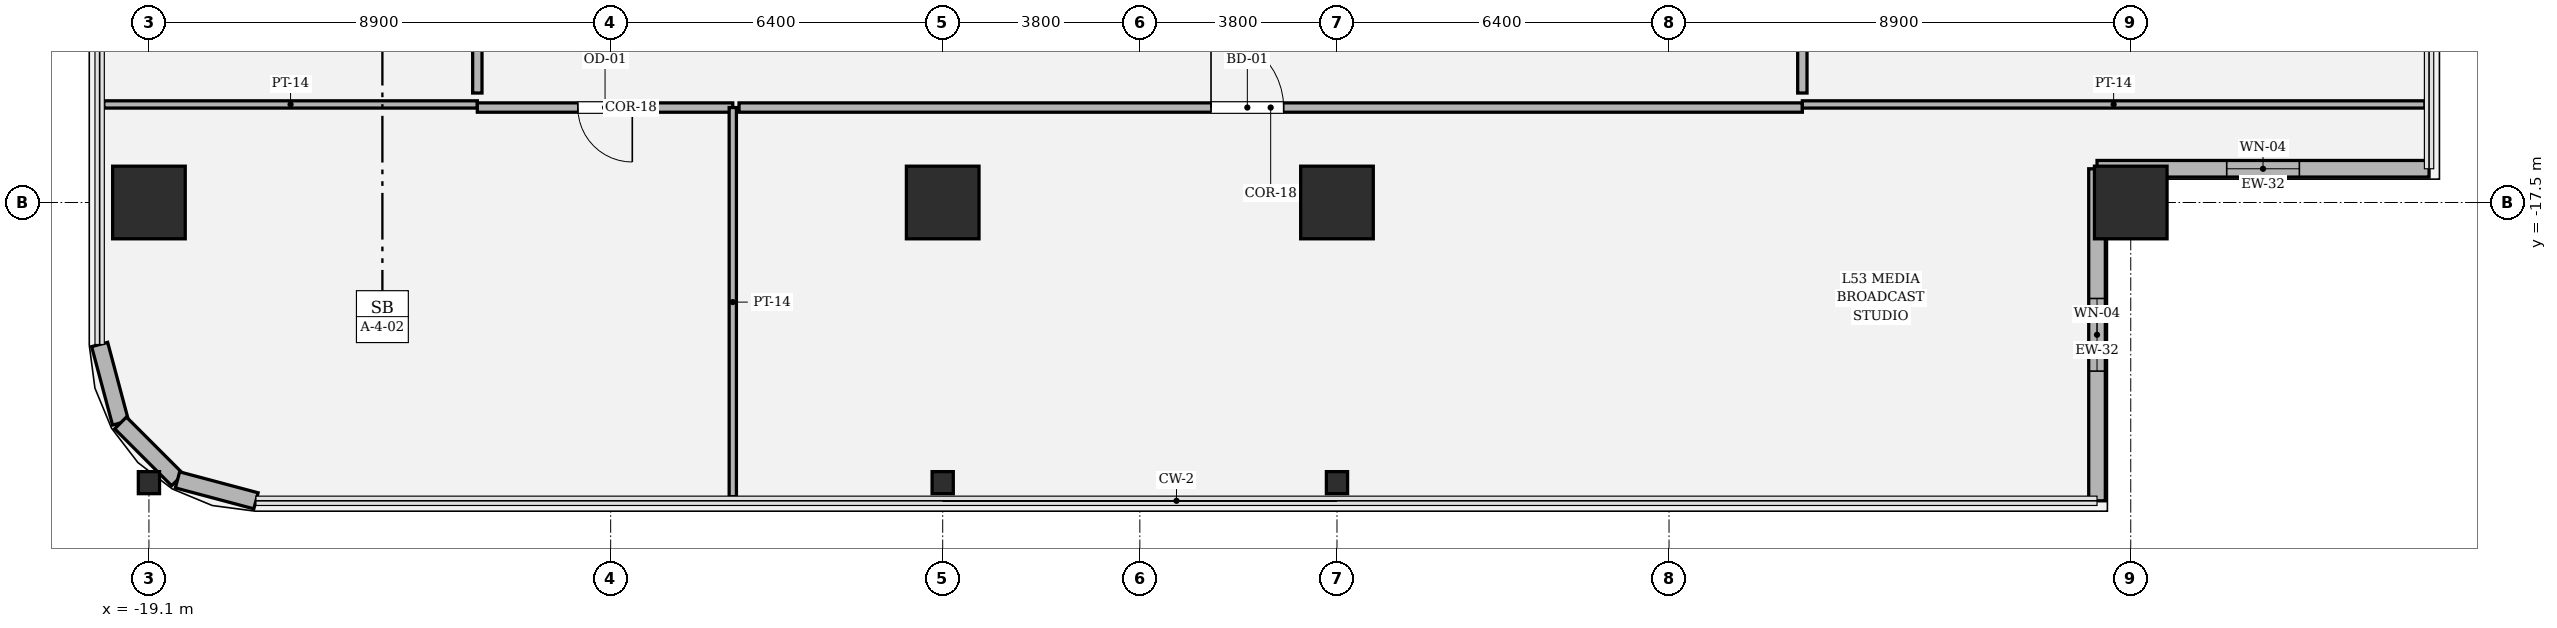
"""IFC4 building model, lengths in metres.
Left out: names, types, materials, properties, quantities, classifications, styles, units other than length and angle.
Written with IfcOpenShell. Run it as: python <this file> out.ifc"""

import sys

from ifc_helpers import new_model, si_unit, direction, frame, frame_2d, origin, origin_2d, place, context, subcontext, project, spatial, rectangle, hollow_rectangle, i_section, extrude, element, fill, save


model = new_model("IFC4")
c1 = context("Model", 3, precision=1e-05, world=origin(), true_north=direction((0.0, 1.0)))
c2 = subcontext(c1, "Body", "Model", "MODEL_VIEW")
j1 = project(units=[si_unit("LENGTHUNIT", "METRE"), si_unit("PLANEANGLEUNIT", "RADIAN")], contexts=[c1])
p1 = place(None, origin())
s1 = spatial("IfcSite", under=j1, at=p1, CompositionType="ELEMENT")
p2 = place(p1, origin())
s2 = spatial("IfcBuilding", under=s1, at=p2, CompositionType="ELEMENT")
p3 = place(p2, frame((0.0, 0.0, 224.85)))
s3 = spatial("IfcBuildingStorey", under=s2, at=p3, CompositionType="ELEMENT", Elevation=224.85)
for number, where, z_axis, x_axis in (
    (1, (-19.1, -17.5, 0.0), (0.0, 0.0, 1.0), (1.0, 0.0, 0.0)),
    (2, (-3.8, -17.5, 0.0), (0.0, 0.0, 1.0), (1.0, 0.0, 0.0)),
    (3, (3.8, -17.5, 0.0), (0.0, 0.0, 1.0), (1.0, 0.0, 0.0)),
    (4, (19.1, -17.5, 0.0), (0.0, 0.0, 1.0), (1.0, 0.0, 0.0)),
):
    element("IfcColumn", number, at=place(p3, frame(where, z_axis=z_axis, x_axis=x_axis)), inside=s3, PredefinedType="COLUMN", context=c2, shape_type="SweptSolid", body=[
        extrude(hollow_rectangle(XDim=1.4, YDim=1.4, WallThickness=0.042, at=origin_2d()), origin(), (0.0, 0.0, 1.0), 4.05),
    ])
for number, where, z_axis, x_axis in (
    (5, (-19.1, -22.9, 0.0), (0.0, 0.0, 1.0), (1.0, 0.0, 0.0)),
    (6, (-3.8, -22.9, 0.0), (0.0, 0.0, 1.0), (1.0, 0.0, 0.0)),
    (7, (3.8, -22.9, 0.0), (0.0, 0.0, 1.0), (1.0, 0.0, 0.0)),
):
    element("IfcColumn", number, at=place(p3, frame(where, z_axis=z_axis, x_axis=x_axis)), inside=s3, PredefinedType="COLUMN", context=c2, shape_type="SweptSolid", body=[
        extrude(i_section(OverallWidth=0.409, OverallDepth=0.425, WebThickness=0.032, FlangeThickness=0.052, FilletRadius=0.018, at=origin_2d()), origin(), (0.0, 0.0, 1.0), 4.048),
    ])
p4 = place(p3, frame((18.45, -23.25, 0.0), z_axis=(0.0, 0.0, 1.0), x_axis=(0.0, 1.0, 0.0)))
e8 = element("IfcWall", 8, at=p4, inside=s3, PredefinedType="SOLIDWALL", context=c2, shape_type="SweptSolid", body=[
    extrude(rectangle(XDim=6.4, YDim=0.32, at=frame_2d((3.2, 0.0))), origin(), (0.0, 0.0, 1.0), 3.174),
])
p5 = place(p4, frame((2.5, 0.0, 0.734)))
e9 = element("IfcOpeningElement", 9, at=p5, cuts=e8, PredefinedType="OPENING", context=c2, shape_type="SweptSolid", body=[
    extrude(rectangle(XDim=1.4, YDim=2.2, at=frame_2d((0.7, 1.1))), frame((0.0, 0.17, 0.0), z_axis=(0.0, -1.0, 0.0), x_axis=(1.0, 0.0, 0.0)), (0.0, 0.0, 1.0), 0.34),
])
p6 = place(p3, frame((18.45, -16.85, 0.0), z_axis=(0.0, 0.0, 1.0), x_axis=(1.0, 0.0, 0.0)))
e10 = element("IfcWall", 10, at=p6, inside=s3, PredefinedType="SOLIDWALL", context=c2, shape_type="SweptSolid", body=[
    extrude(rectangle(XDim=6.4, YDim=0.32, at=frame_2d((3.2, 0.0))), origin(), (0.0, 0.0, 1.0), 3.174),
])
p7 = place(p6, frame((2.5, 0.0, 0.734)))
e11 = element("IfcOpeningElement", 11, at=p7, cuts=e10, PredefinedType="OPENING", context=c2, shape_type="SweptSolid", body=[
    extrude(rectangle(XDim=1.4, YDim=2.2, at=frame_2d((0.7, 1.1))), frame((0.0, 0.17, 0.0), z_axis=(0.0, -1.0, 0.0), x_axis=(1.0, 0.0, 0.0)), (0.0, 0.0, 1.0), 0.34),
])
p8 = place(p3, frame((-20.05, -20.237, 0.0), z_axis=(0.0, 0.0, 1.0), x_axis=(0.257847112249, -0.966185730957, 0.0)))
e12 = element("IfcWall", 12, at=p8, inside=s3, PredefinedType="SOLIDWALL", context=c2, shape_type="SweptSolid", body=[
    extrude(rectangle(XDim=1.565, YDim=0.32, at=frame_2d((0.783, 0.0))), origin(), (0.0, 0.0, 1.0), 3.83),
])
p9 = place(p3, frame((-19.646, -21.749, 0.0), z_axis=(0.0, 0.0, 1.0), x_axis=(0.707028130747, -0.707185422879, 0.0)))
e13 = element("IfcWall", 13, at=p9, inside=s3, PredefinedType="SOLIDWALL", context=c2, shape_type="SweptSolid", body=[
    extrude(rectangle(XDim=1.552, YDim=0.32, at=frame_2d((0.776, 0.0))), origin(), (0.0, 0.0, 1.0), 2.504),
])
p10 = place(p3, frame((-18.549, -22.847, 0.0), z_axis=(0.0, 0.0, 1.0), x_axis=(0.966224582397, -0.257701486942, 0.0)))
e14 = element("IfcWall", 14, at=p10, inside=s3, PredefinedType="SOLIDWALL", context=c2, shape_type="SweptSolid", body=[
    extrude(rectangle(XDim=1.565, YDim=0.32, at=frame_2d((0.783, 0.0))), origin(), (0.0, 0.0, 1.0), 2.544),
])
p11 = place(p3, frame((-19.97, -15.61, 0.0), z_axis=(0.0, 0.0, 1.0), x_axis=(1.0, 0.0, 0.0)))
e15 = element("IfcWall", 15, at=p11, inside=s3, PredefinedType="PARTITIONING", context=c2, shape_type="SweptSolid", body=[
    extrude(rectangle(XDim=7.2, YDim=0.14, at=frame_2d((3.6, 0.0))), origin(), (0.0, 0.0, 1.0), 3.174),
])
p12 = place(p3, frame((-12.77, -15.67, 0.0), z_axis=(0.0, 0.0, 1.0), x_axis=(1.0, 0.0, 0.0)))
e16 = element("IfcWall", 16, at=p12, inside=s3, PredefinedType="PARTITIONING", context=c2, shape_type="SweptSolid", body=[
    extrude(rectangle(XDim=4.924, YDim=0.18, at=frame_2d((2.462, 0.0))), origin(), (0.0, 0.0, 1.0), 3.174),
])
p13 = place(p12, frame((1.937, 0.0, 0.0)))
e17 = element("IfcOpeningElement", 17, at=p13, cuts=e16, PredefinedType="OPENING", context=c2, shape_type="SweptSolid", body=[
    extrude(rectangle(XDim=1.05, YDim=2.2, at=frame_2d((0.525, 1.1))), frame((0.0, 0.1, 0.0), z_axis=(0.0, -1.0, 0.0), x_axis=(1.0, 0.0, 0.0)), (0.0, 0.0, 1.0), 0.2),
])
p14 = place(p3, frame((-7.846, -15.67, 0.0), z_axis=(0.0, 0.0, 1.0), x_axis=(0.0, -1.0, 0.0)))
e18 = element("IfcWall", 18, at=p14, inside=s3, PredefinedType="PARTITIONING", context=c2, shape_type="SweptSolid", body=[
    extrude(rectangle(XDim=7.5, YDim=0.14, at=frame_2d((3.75, 0.0))), origin(), (0.0, 0.0, 1.0), 2.544),
])
p15 = place(p3, frame((-7.726, -15.67, 0.0), z_axis=(0.0, 0.0, 1.0), x_axis=(1.0, 0.0, 0.0)))
e19 = element("IfcWall", 19, at=p15, inside=s3, PredefinedType="PARTITIONING", context=c2, shape_type="SweptSolid", body=[
    extrude(rectangle(XDim=20.496, YDim=0.18, at=frame_2d((10.248, 0.0))), origin(), (0.0, 0.0, 1.0), 3.174),
])
p16 = place(p15, frame((9.098, 0.0, 0.0)))
e20 = element("IfcOpeningElement", 20, at=p16, cuts=e19, PredefinedType="OPENING", context=c2, shape_type="SweptSolid", body=[
    extrude(rectangle(XDim=1.4, YDim=2.25, at=frame_2d((0.7, 1.125))), frame((0.0, 0.1, 0.0), z_axis=(0.0, -1.0, 0.0), x_axis=(1.0, 0.0, 0.0)), (0.0, 0.0, 1.0), 0.2),
])
p17 = place(p3, frame((12.77, -15.61, 0.0), z_axis=(0.0, 0.0, 1.0), x_axis=(1.0, 0.0, 0.0)))
e21 = element("IfcWall", 21, at=p17, inside=s3, PredefinedType="PARTITIONING", context=c2, shape_type="SweptSolid", body=[
    extrude(rectangle(XDim=12.0, YDim=0.14, at=frame_2d((6.0, 0.0))), origin(), (0.0, 0.0, 1.0), 3.174),
])
for number, where, z_axis, x_axis in (
    (22, (-12.77, -13.38, 0.0), (0.0, 0.0, 1.0), (0.0, -1.0, 0.0)),
    (23, (12.77, -15.39, 0.0), (0.0, 0.0, 1.0), (0.0, 1.0, 0.0)),
):
    element("IfcWall", number, at=place(p3, frame(where, z_axis=z_axis, x_axis=x_axis)), inside=s3, PredefinedType="PARTITIONING", context=c2, shape_type="SweptSolid", body=[
        extrude(rectangle(XDim=2.01, YDim=0.18, at=frame_2d((1.005, 0.0))), origin(), (0.0, 0.0, 1.0), 3.424),
    ])
p18 = place(p5, origin())
e24 = element("IfcWindow", 24, at=p18, inside=s3, PartitioningType="SINGLE_PANEL", PredefinedType="WINDOW", context=c2, shape_type="SweptSolid", body=[
    extrude(rectangle(XDim=1.4, YDim=2.2, at=frame_2d((0.7, 1.1))), frame((0.0, 0.03, 0.0), z_axis=(0.0, -1.0, 0.0), x_axis=(1.0, 0.0, 0.0)), (0.0, 0.0, 1.0), 0.06),
])
fill(e9, e24)
p19 = place(p7, origin())
e25 = element("IfcWindow", 25, at=p19, inside=s3, PartitioningType="SINGLE_PANEL", PredefinedType="WINDOW", context=c2, shape_type="SweptSolid", body=[
    extrude(rectangle(XDim=1.4, YDim=2.2, at=frame_2d((0.7, 1.1))), frame((0.0, 0.03, 0.0), z_axis=(0.0, -1.0, 0.0), x_axis=(1.0, 0.0, 0.0)), (0.0, 0.0, 1.0), 0.06),
])
fill(e11, e25)
p20 = place(p13, origin())
e26 = element("IfcDoor", 26, at=p20, inside=s3, OperationType="SINGLE_SWING_RIGHT", PredefinedType="DOOR", context=c2, shape_type="SweptSolid", body=[
    extrude(rectangle(XDim=1.05, YDim=2.2, at=frame_2d((0.525, 1.1))), frame((0.0, 0.025, 0.0), z_axis=(0.0, -1.0, 0.0), x_axis=(1.0, 0.0, 0.0)), (0.0, 0.0, 1.0), 0.05),
])
fill(e17, e26)
p21 = place(p16, origin())
e27 = element("IfcDoor", 27, at=p21, inside=s3, OperationType="SINGLE_SWING_LEFT", PredefinedType="DOOR", context=c2, shape_type="SweptSolid", body=[
    extrude(rectangle(XDim=1.4, YDim=2.25, at=frame_2d((0.7, 1.125))), frame((0.0, 0.025, 0.0), z_axis=(0.0, -1.0, 0.0), x_axis=(1.0, 0.0, 0.0)), (0.0, 0.0, 1.0), 0.05),
])
fill(e20, e27)
save(model, sys.argv[1])
